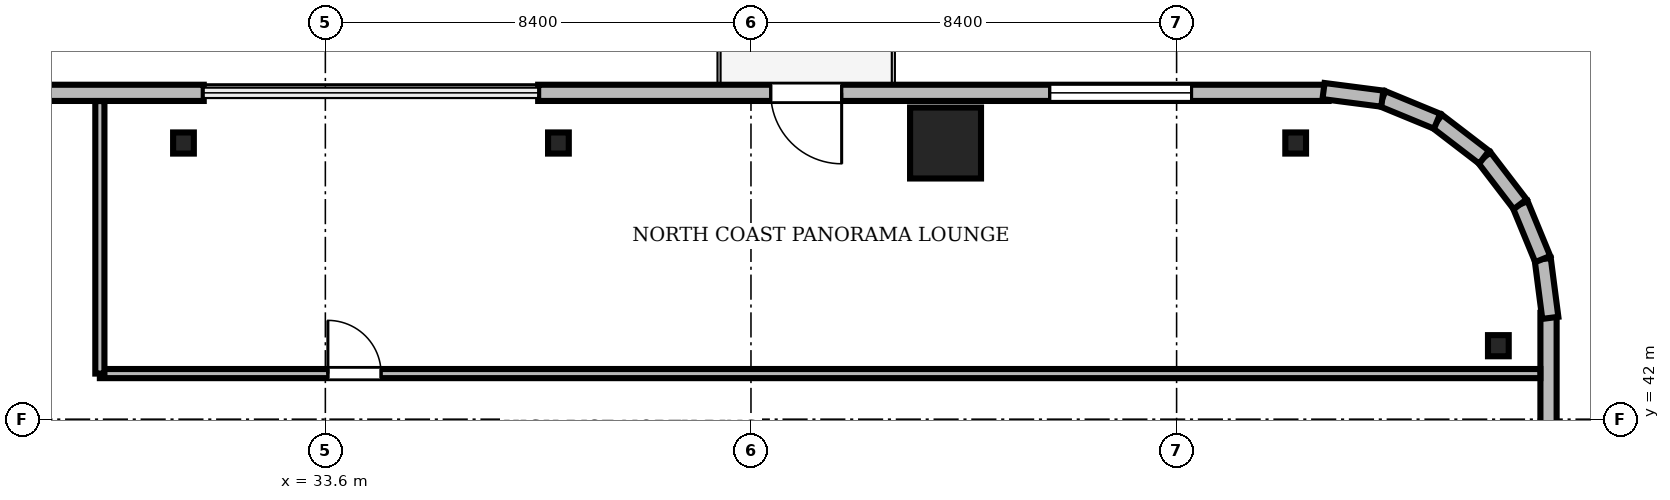
"""IFC4 building model, lengths in metres.
Left out: names, types, materials, properties, quantities, classifications, styles, units other than length and angle.
Written with IfcOpenShell. Run it as: python <this file> out.ifc"""

import sys

from ifc_helpers import new_model, si_unit, direction, frame, frame_2d, origin, origin_2d, place, context, subcontext, project, spatial, rectangle, i_section, extrude, source, transform, mapped, element, fill, save


model = new_model("IFC4")
c1 = context("Model", 3, precision=1e-05, world=origin(), true_north=direction((0.0, 1.0)))
c2 = subcontext(c1, "Body", "Model", "MODEL_VIEW")
j1 = project(units=[si_unit("LENGTHUNIT", "METRE"), si_unit("PLANEANGLEUNIT", "RADIAN")], contexts=[c1])
p1 = place(None, origin())
s1 = spatial("IfcSite", under=j1, at=p1, CompositionType="ELEMENT")
p2 = place(p1, origin())
s2 = spatial("IfcBuilding", under=s1, at=p2, CompositionType="ELEMENT")
p3 = place(p2, frame((0.0, 0.0, 226.05)))
s3 = spatial("IfcBuildingStorey", under=s2, at=p3, CompositionType="ELEMENT", Elevation=226.05)
m1 = source(origin(), c2, "Body", "SweptSolid", [
    extrude(rectangle(XDim=1.4, YDim=1.4, at=origin_2d()), origin(), (0.0, 0.0, 1.0), 3.53),
])
p4 = place(p3, frame((45.84, 47.45, 0.0), z_axis=(0.0, 0.0, 1.0), x_axis=(1.0, 0.0, 0.0)))
e1 = element("IfcColumn", 1, at=p4, inside=s3, PredefinedType="COLUMN", context=c2, shape_type="MappedRepresentation", body=[
    mapped(m1, transform((0.0, 0.0, 0.0), scale=1.0)),
])
m2 = source(origin(), c2, "Body", "SweptSolid", [
    extrude(i_section(OverallWidth=0.409, OverallDepth=0.417, WebThickness=0.021, FlangeThickness=0.033, FilletRadius=0.015, at=origin_2d()), origin(), (0.0, 0.0, 1.0), 3.53),
])
for number, where, z_axis, x_axis in (
    (2, (56.75, 43.45, 0.0), (0.0, 0.0, 1.0), (1.0, 0.0, 0.0)),
    (3, (52.75, 47.45, 0.0), (0.0, 0.0, 1.0), (1.0, 0.0, 0.0)),
    (4, (38.2, 47.45, 0.0), (0.0, 0.0, 1.0), (1.0, 0.0, 0.0)),
    (5, (30.8, 47.45, 0.0), (0.0, 0.0, 1.0), (1.0, 0.0, 0.0)),
):
    element("IfcColumn", number, at=place(p3, frame(where, z_axis=z_axis, x_axis=x_axis)), inside=s3, PredefinedType="COLUMN", context=c2, shape_type="MappedRepresentation", body=[
        mapped(m2, transform((0.0, 0.0, 0.0), scale=1.0)),
    ])
m3 = source(origin(), c2, "Body", "SweptSolid", [
    extrude(rectangle(XDim=15.6, YDim=0.32, at=frame_2d((7.8, 0.0))), origin(), (0.0, 0.0, 1.0), 3.53),
])
p5 = place(p3, frame((53.4, 48.44, 0.0), z_axis=(0.0, 0.0, 1.0), x_axis=(-1.0, 0.0, 0.0)))
e6 = element("IfcWall", 6, at=p5, inside=s3, PredefinedType="SOLIDWALL", context=c2, shape_type="MappedRepresentation", body=[
    mapped(m3, transform((0.0, 0.0, 0.0), scale=1.0)),
])
m4 = source(origin(), c2, "Body", "SweptSolid", [
    extrude(rectangle(XDim=1.4, YDim=2.3, at=frame_2d((0.7, 1.15))), frame((0.0, 0.17, 0.0), z_axis=(0.0, -1.0, 0.0), x_axis=(1.0, 0.0, 0.0)), (0.0, 0.0, 1.0), 0.34),
])
p6 = place(p5, frame((9.61, 0.0, 0.0)))
e7 = element("IfcOpeningElement", 7, at=p6, cuts=e6, PredefinedType="OPENING", context=c2, shape_type="MappedRepresentation", body=[
    mapped(m4, transform((0.0, 0.0, 0.0), scale=1.0)),
])
m5 = source(origin(), c2, "Body", "SweptSolid", [
    extrude(rectangle(XDim=2.8, YDim=2.4, at=frame_2d((1.4, 1.2))), frame((0.0, 0.17, 0.0), z_axis=(0.0, -1.0, 0.0), x_axis=(1.0, 0.0, 0.0)), (0.0, 0.0, 1.0), 0.34),
])
p7 = place(p5, frame((2.705, 0.0, 0.72)))
e8 = element("IfcOpeningElement", 8, at=p7, cuts=e6, PredefinedType="OPENING", context=c2, shape_type="MappedRepresentation", body=[
    mapped(m5, transform((0.0, 0.0, 0.0), scale=1.0)),
])
p8 = place(p3, frame((31.2, 48.44, 0.0), z_axis=(0.0, 0.0, 1.0), x_axis=(-1.0, 0.0, 0.0)))
e9 = element("IfcWall", 9, at=p8, inside=s3, PredefinedType="SOLIDWALL", context=c2, shape_type="MappedRepresentation", body=[
    mapped(m3, transform((0.0, 0.0, 0.0), scale=1.0)),
])
p9 = place(p8, frame((10.095, 0.0, 0.72)))
e10 = element("IfcOpeningElement", 10, at=p9, cuts=e9, PredefinedType="OPENING", context=c2, shape_type="MappedRepresentation", body=[
    mapped(m5, transform((0.0, 0.0, 0.0), scale=1.0)),
])
m6 = source(origin(), c2, "Body", "SweptSolid", [
    extrude(rectangle(XDim=15.6, YDim=0.32, at=frame_2d((7.8, 0.0))), origin(), (0.0, 0.0, 1.0), 3.53),
])
p10 = place(p3, frame((57.74, 28.5, 0.0), z_axis=(0.0, 0.0, 1.0), x_axis=(0.0, 1.0, 0.0)))
e11 = element("IfcWall", 11, at=p10, inside=s3, PredefinedType="SOLIDWALL", context=c2, shape_type="MappedRepresentation", body=[
    mapped(m6, transform((0.0, 0.0, 0.0), scale=1.0)),
])
p11 = place(p10, frame((10.095, 0.0, 0.72)))
e12 = element("IfcOpeningElement", 12, at=p11, cuts=e11, PredefinedType="OPENING", context=c2, shape_type="MappedRepresentation", body=[
    mapped(m5, transform((0.0, 0.0, 0.0), scale=1.0)),
])
m7 = source(origin(), c2, "Body", "SweptSolid", [
    extrude(rectangle(XDim=1.17, YDim=0.32, at=frame_2d((0.585, 0.0))), origin(), (0.0, 0.0, 1.0), 3.53),
])
p12 = place(p3, frame((57.776, 44.0, 0.0), z_axis=(0.0, 0.0, 1.0), x_axis=(-0.128295670475, 0.991735963317, 0.0)))
e13 = element("IfcWall", 13, at=p12, inside=s3, PredefinedType="SOLIDWALL", context=c2, shape_type="MappedRepresentation", body=[
    mapped(m7, transform((0.0, 0.0, 0.0), scale=1.0)),
])
m8 = source(origin(), c2, "Body", "SweptSolid", [
    extrude(rectangle(XDim=1.169, YDim=0.32, at=frame_2d((0.584, 0.0))), origin(), (0.0, 0.0, 1.0), 3.53),
])
p13 = place(p3, frame((57.625, 45.16, 0.0), z_axis=(0.0, 0.0, 1.0), x_axis=(-0.381054331552, 0.924552646638, 0.0)))
e14 = element("IfcWall", 14, at=p13, inside=s3, PredefinedType="SOLIDWALL", context=c2, shape_type="MappedRepresentation", body=[
    mapped(m8, transform((0.0, 0.0, 0.0), scale=1.0)),
])
m9 = source(origin(), c2, "Body", "SweptSolid", [
    extrude(rectangle(XDim=1.169, YDim=0.32, at=frame_2d((0.584, 0.0))), origin(), (0.0, 0.0, 1.0), 3.53),
])
p14 = place(p3, frame((57.18, 46.241, 0.0), z_axis=(0.0, 0.0, 1.0), x_axis=(-0.608387696831, 0.793639975269, 0.0)))
e15 = element("IfcWall", 15, at=p14, inside=s3, PredefinedType="SOLIDWALL", context=c2, shape_type="MappedRepresentation", body=[
    mapped(m9, transform((0.0, 0.0, 0.0), scale=1.0)),
])
m10 = source(origin(), c2, "Body", "SweptSolid", [
    extrude(rectangle(XDim=1.169, YDim=0.32, at=frame_2d((0.584, 0.0))), origin(), (0.0, 0.0, 1.0), 3.53),
])
p15 = place(p3, frame((56.469, 47.169, 0.0), z_axis=(0.0, 0.0, 1.0), x_axis=(-0.793663520347, 0.608356981114, 0.0)))
e16 = element("IfcWall", 16, at=p15, inside=s3, PredefinedType="SOLIDWALL", context=c2, shape_type="MappedRepresentation", body=[
    mapped(m10, transform((0.0, 0.0, 0.0), scale=1.0)),
])
p16 = place(p3, frame((55.541, 47.88, 0.0), z_axis=(0.0, 0.0, 1.0), x_axis=(-0.924552646638, 0.381054331552, 0.0)))
e17 = element("IfcWall", 17, at=p16, inside=s3, PredefinedType="SOLIDWALL", context=c2, shape_type="MappedRepresentation", body=[
    mapped(m8, transform((0.0, 0.0, 0.0), scale=1.0)),
])
p17 = place(p3, frame((54.46, 48.325, 0.0), z_axis=(0.0, 0.0, 1.0), x_axis=(-0.991735963317, 0.128295670475, 0.0)))
e18 = element("IfcWall", 18, at=p17, inside=s3, PredefinedType="SOLIDWALL", context=c2, shape_type="MappedRepresentation", body=[
    mapped(m7, transform((0.0, 0.0, 0.0), scale=1.0)),
])
m11 = source(origin(), c2, "Body", "SweptSolid", [
    extrude(rectangle(XDim=28.428, YDim=0.18, at=frame_2d((14.214, 0.0))), origin(), (0.0, 0.0, 1.0), 2.772),
])
p18 = place(p3, frame((29.15, 42.9, 0.0), z_axis=(0.0, 0.0, 1.0), x_axis=(1.0, 0.0, 0.0)))
e19 = element("IfcWall", 19, at=p18, inside=s3, PredefinedType="PARTITIONING", context=c2, shape_type="MappedRepresentation", body=[
    mapped(m11, transform((0.0, 0.0, 0.0), scale=1.0)),
])
m12 = source(origin(), c2, "Body", "SweptSolid", [
    extrude(rectangle(XDim=1.05, YDim=2.2, at=frame_2d((0.525, 1.1))), frame((0.0, 0.1, 0.0), z_axis=(0.0, -1.0, 0.0), x_axis=(1.0, 0.0, 0.0)), (0.0, 0.0, 1.0), 0.2),
])
p19 = place(p18, frame((4.5, 0.0, 0.0)))
e20 = element("IfcOpeningElement", 20, at=p19, cuts=e19, PredefinedType="OPENING", context=c2, shape_type="MappedRepresentation", body=[
    mapped(m12, transform((0.0, 0.0, 0.0), scale=1.0)),
])
m13 = source(origin(), c2, "Body", "SweptSolid", [
    extrude(rectangle(XDim=5.378, YDim=0.18, at=frame_2d((2.689, 0.0))), origin(), (0.0, 0.0, 1.0), 2.772),
])
p20 = place(p3, frame((29.15, 42.9, 0.0), z_axis=(0.0, 0.0, 1.0), x_axis=(0.0, 1.0, 0.0)))
e21 = element("IfcWall", 21, at=p20, inside=s3, PredefinedType="PARTITIONING", context=c2, shape_type="MappedRepresentation", body=[
    mapped(m13, transform((0.0, 0.0, 0.0), scale=1.0)),
])
m14 = source(origin(), c2, "Body", "SweptSolid", [
    extrude(rectangle(XDim=1.4, YDim=2.3, at=frame_2d((0.7, 1.15))), frame((0.0, 0.025, 0.0), z_axis=(0.0, -1.0, 0.0), x_axis=(1.0, 0.0, 0.0)), (0.0, 0.0, 1.0), 0.05),
])
p21 = place(p6, frame((1.4, 0.0, 0.0), z_axis=(0.0, 0.0, 1.0), x_axis=(-1.0, 0.0, 0.0)))
e22 = element("IfcDoor", 22, at=p21, inside=s3, OperationType="DOUBLE_DOOR_SLIDING", PredefinedType="DOOR", context=c2, shape_type="MappedRepresentation", body=[
    mapped(m14, transform((0.0, 0.0, 0.0), scale=1.0)),
])
fill(e7, e22)
m15 = source(origin(), c2, "Body", "SweptSolid", [
    extrude(rectangle(XDim=2.8, YDim=2.4, at=frame_2d((1.4, 1.2))), frame((0.0, 0.03, 0.0), z_axis=(0.0, -1.0, 0.0), x_axis=(1.0, 0.0, 0.0)), (0.0, 0.0, 1.0), 0.06),
])
p22 = place(p7, origin())
e23 = element("IfcWindow", 23, at=p22, inside=s3, PartitioningType="SINGLE_PANEL", PredefinedType="WINDOW", context=c2, shape_type="MappedRepresentation", body=[
    mapped(m15, transform((0.0, 0.0, 0.0), scale=1.0)),
])
fill(e8, e23)
m16 = source(origin(), c2, "Body", "SweptSolid", [
    extrude(rectangle(XDim=1.05, YDim=2.2, at=frame_2d((0.525, 1.1))), frame((0.0, 0.025, 0.0), z_axis=(0.0, -1.0, 0.0), x_axis=(1.0, 0.0, 0.0)), (0.0, 0.0, 1.0), 0.05),
])
p23 = place(p19, origin())
e24 = element("IfcDoor", 24, at=p23, inside=s3, OperationType="SINGLE_SWING_LEFT", PredefinedType="DOOR", context=c2, shape_type="MappedRepresentation", body=[
    mapped(m16, transform((0.0, 0.0, 0.0), scale=1.0)),
])
fill(e20, e24)
save(model, sys.argv[1])
